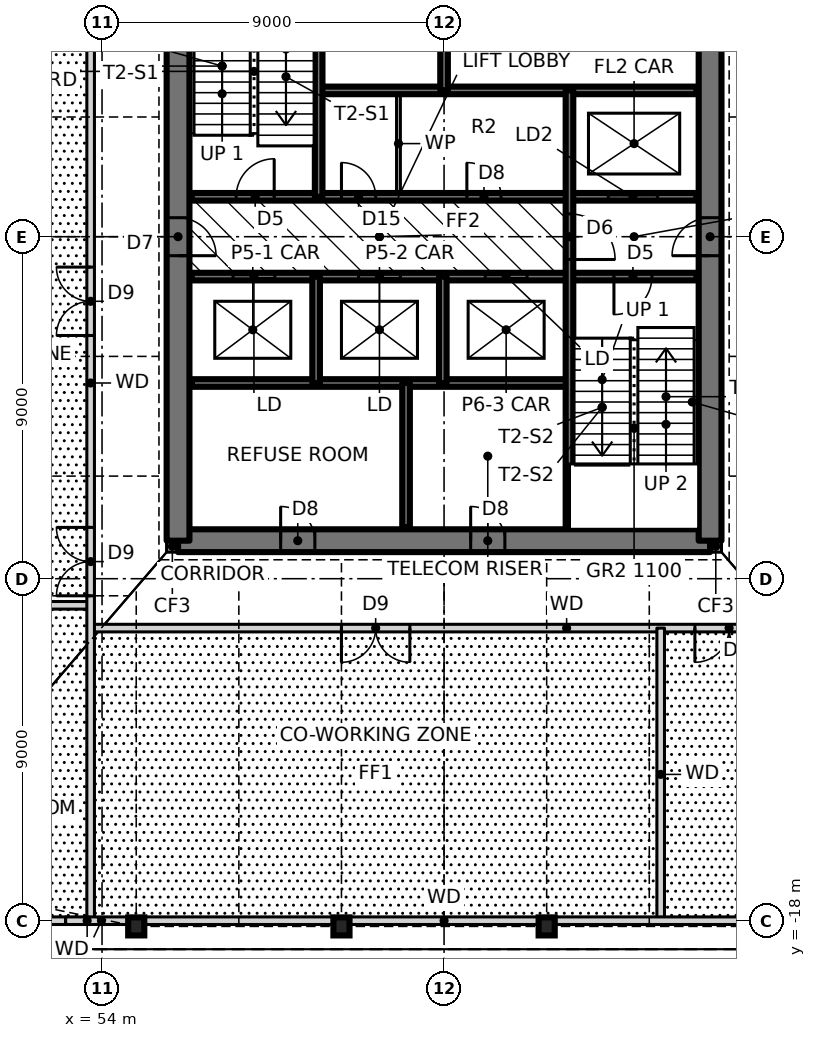
"""IFC4 building model, lengths in metres.
Left out: names, types, materials, properties, quantities, classifications, styles, units other than length and angle.
Written with IfcOpenShell. Run it as: python <this file> out.ifc"""

import sys

from ifc_helpers import new_model, si_unit, direction, frame, frame_2d, origin, origin_2d, place, context, subcontext, project, spatial, rectangle, i_section, extrude, element, fill, save


model = new_model("IFC4")
c1 = context("Model", 3, precision=1e-05, world=origin(), true_north=direction((0.0, 1.0)))
c2 = subcontext(c1, "Body", "Model", "MODEL_VIEW")
j1 = project(units=[si_unit("LENGTHUNIT", "METRE"), si_unit("PLANEANGLEUNIT", "RADIAN")], contexts=[c1])
p1 = place(None, origin())
s1 = spatial("IfcSite", under=j1, at=p1, CompositionType="ELEMENT")
p2 = place(p1, origin())
s2 = spatial("IfcBuilding", under=s1, at=p2, CompositionType="ELEMENT")
p3 = place(p2, frame((0.0, 0.0, 6.0)))
s3 = spatial("IfcBuildingStorey", under=s2, at=p3, CompositionType="ELEMENT", Elevation=6.0)
for number, where, z_axis, x_axis in (
    (1, (54.9, -18.15, 0.0), (0.0, 0.0, 1.0), (1.0, 0.0, 0.0)),
    (2, (60.3, -18.15, 0.0), (0.0, 0.0, 1.0), (1.0, 0.0, 0.0)),
    (3, (65.7, -18.15, 0.0), (0.0, 0.0, 1.0), (1.0, 0.0, 0.0)),
):
    element("IfcColumn", number, at=place(p3, frame(where, z_axis=z_axis, x_axis=x_axis)), inside=s3, PredefinedType="COLUMN", context=c2, shape_type="SweptSolid", body=[
        extrude(i_section(OverallWidth=0.424, OverallDepth=0.475, WebThickness=0.048, FlangeThickness=0.077, at=origin_2d()), origin(), (0.0, 0.0, 1.0), 4.5),
    ])
for number, where, z_axis, x_axis in (
    (4, (55.7, -8.15, 0.0), (0.0, 0.0, 1.0), (1.0, 0.0, 0.0)),
    (5, (70.0, -8.15, 0.0), (0.0, 0.0, 1.0), (1.0, 0.0, 0.0)),
):
    element("IfcWall", number, at=place(p3, frame(where, z_axis=z_axis, x_axis=x_axis)), inside=s3, PredefinedType="SOLIDWALL", context=c2, shape_type="SweptSolid", body=[
        extrude(rectangle(XDim=0.3, YDim=0.3, at=frame_2d((0.15, 0.0))), origin(), (0.0, 0.0, 1.0), 4.5),
    ])
p4 = place(p3, frame((56.0, -8.0, 0.0), z_axis=(0.0, 0.0, 1.0), x_axis=(1.0, 0.0, 0.0)))
e6 = element("IfcWall", 6, at=p4, inside=s3, PredefinedType="SHEAR", context=c2, shape_type="SweptSolid", body=[
    extrude(rectangle(XDim=14.0, YDim=0.6, at=frame_2d((7.0, 0.0))), origin(), (0.0, 0.0, 1.0), 4.5),
])
p5 = place(p4, frame((2.7, 0.0, 0.0)))
e7 = element("IfcOpeningElement", 7, at=p5, cuts=e6, PredefinedType="OPENING", context=c2, shape_type="SweptSolid", body=[
    extrude(rectangle(XDim=0.9, YDim=2.1, at=frame_2d((0.45, 1.05))), frame((0.0, 0.31, 0.0), z_axis=(0.0, -1.0, 0.0), x_axis=(1.0, 0.0, 0.0)), (0.0, 0.0, 1.0), 0.62),
])
p6 = place(p4, frame((7.7, 0.0, 0.0)))
e8 = element("IfcOpeningElement", 8, at=p6, cuts=e6, PredefinedType="OPENING", context=c2, shape_type="SweptSolid", body=[
    extrude(rectangle(XDim=0.9, YDim=2.1, at=frame_2d((0.45, 1.05))), frame((0.0, 0.31, 0.0), z_axis=(0.0, -1.0, 0.0), x_axis=(1.0, 0.0, 0.0)), (0.0, 0.0, 1.0), 0.62),
])
p7 = place(p3, frame((70.0, -8.0, 0.0), z_axis=(0.0, 0.0, 1.0), x_axis=(0.0, 1.0, 0.0)))
e9 = element("IfcWall", 9, at=p7, inside=s3, PredefinedType="SHEAR", context=c2, shape_type="SweptSolid", body=[
    extrude(rectangle(XDim=16.0, YDim=0.6, at=frame_2d((8.0, 0.0))), origin(), (0.0, 0.0, 1.0), 4.5),
])
p8 = place(p7, frame((7.5, 0.0, 0.0)))
e10 = element("IfcOpeningElement", 10, at=p8, cuts=e9, PredefinedType="OPENING", context=c2, shape_type="SweptSolid", body=[
    extrude(rectangle(XDim=1.0, YDim=2.1, at=frame_2d((0.5, 1.05))), frame((0.0, 0.31, 0.0), z_axis=(0.0, -1.0, 0.0), x_axis=(1.0, 0.0, 0.0)), (0.0, 0.0, 1.0), 0.62),
])
p9 = place(p3, frame((56.0, 8.0, 0.0), z_axis=(0.0, 0.0, 1.0), x_axis=(0.0, -1.0, 0.0)))
e11 = element("IfcWall", 11, at=p9, inside=s3, PredefinedType="SHEAR", context=c2, shape_type="SweptSolid", body=[
    extrude(rectangle(XDim=16.0, YDim=0.6, at=frame_2d((8.0, 0.0))), origin(), (0.0, 0.0, 1.0), 4.5),
])
p10 = place(p9, frame((7.5, 0.0, 0.0)))
e12 = element("IfcOpeningElement", 12, at=p10, cuts=e11, PredefinedType="OPENING", context=c2, shape_type="SweptSolid", body=[
    extrude(rectangle(XDim=1.0, YDim=2.1, at=frame_2d((0.5, 1.05))), frame((0.0, 0.31, 0.0), z_axis=(0.0, -1.0, 0.0), x_axis=(1.0, 0.0, 0.0)), (0.0, 0.0, 1.0), 0.62),
])
p11 = place(p3, frame((47.25, -18.0, 0.0), z_axis=(0.0, 0.0, 1.0), x_axis=(1.0, 0.0, 0.0)))
e13 = element("IfcWall", 13, at=p11, inside=s3, PredefinedType="SOLIDWALL", context=c2, shape_type="SweptSolid", body=[
    extrude(rectangle(XDim=5.793, YDim=0.2, at=frame_2d((2.896, 0.0))), origin(), (0.0, 0.0, 1.0), 4.25),
])
p12 = place(p3, frame((53.7, -10.3, 0.0), z_axis=(0.0, 0.0, 1.0), x_axis=(1.0, 0.0, 0.0)))
e14 = element("IfcWall", 14, at=p12, inside=s3, PredefinedType="SOLIDWALL", context=c2, shape_type="SweptSolid", body=[
    extrude(rectangle(XDim=25.05, YDim=0.2, at=frame_2d((12.525, 0.0))), origin(), (0.0, 0.0, 1.0), 4.25),
])
p13 = place(p12, frame((6.6, 0.0, 0.0)))
e15 = element("IfcOpeningElement", 15, at=p13, cuts=e14, PredefinedType="OPENING", context=c2, shape_type="SweptSolid", body=[
    extrude(rectangle(XDim=1.8, YDim=2.1, at=frame_2d((0.9, 1.05))), frame((0.0, 0.11, 0.0), z_axis=(0.0, -1.0, 0.0), x_axis=(1.0, 0.0, 0.0)), (0.0, 0.0, 1.0), 0.22),
])
p14 = place(p12, frame((15.9, 0.0, 0.0)))
e16 = element("IfcOpeningElement", 16, at=p14, cuts=e14, PredefinedType="OPENING", context=c2, shape_type="SweptSolid", body=[
    extrude(rectangle(XDim=1.8, YDim=2.1, at=frame_2d((0.9, 1.05))), frame((0.0, 0.11, 0.0), z_axis=(0.0, -1.0, 0.0), x_axis=(1.0, 0.0, 0.0)), (0.0, 0.0, 1.0), 0.22),
])
p15 = place(p3, frame((47.25, -9.7, 0.0), z_axis=(0.0, 0.0, 1.0), x_axis=(1.0, 0.0, 0.0)))
e17 = element("IfcWall", 17, at=p15, inside=s3, PredefinedType="SOLIDWALL", context=c2, shape_type="SweptSolid", body=[
    extrude(rectangle(XDim=6.45, YDim=0.2, at=frame_2d((3.225, 0.0))), origin(), (0.0, 0.0, 1.0), 4.25),
])
p16 = place(p15, frame((2.325, 0.0, 0.0)))
e18 = element("IfcOpeningElement", 18, at=p16, cuts=e17, PredefinedType="OPENING", context=c2, shape_type="SweptSolid", body=[
    extrude(rectangle(XDim=1.8, YDim=2.1, at=frame_2d((0.9, 1.05))), frame((0.0, 0.11, 0.0), z_axis=(0.0, -1.0, 0.0), x_axis=(1.0, 0.0, 0.0)), (0.0, 0.0, 1.0), 0.22),
])
p17 = place(p3, frame((56.36, -3.85, 0.0), z_axis=(0.0, 0.0, 1.0), x_axis=(1.0, 0.0, 0.0)))
e19 = element("IfcWall", 19, at=p17, inside=s3, PredefinedType="SOLIDWALL", context=c2, shape_type="SweptSolid", body=[
    extrude(rectangle(XDim=9.94, YDim=0.2, at=frame_2d((4.97, 0.0))), origin(), (0.0, 0.0, 1.0), 4.5),
])
p18 = place(p3, frame((56.36, -1.05, 0.0), z_axis=(0.0, 0.0, 1.0), x_axis=(1.0, 0.0, 0.0)))
e20 = element("IfcWall", 20, at=p18, inside=s3, PredefinedType="SOLIDWALL", context=c2, shape_type="SweptSolid", body=[
    extrude(rectangle(XDim=13.28, YDim=0.2, at=frame_2d((6.64, 0.0))), origin(), (0.0, 0.0, 1.0), 4.5),
])
p19 = place(p18, frame((11.11, 0.0, 0.0)))
e21 = element("IfcOpeningElement", 21, at=p19, cuts=e20, PredefinedType="OPENING", context=c2, shape_type="SweptSolid", body=[
    extrude(rectangle(XDim=1.0, YDim=2.1, at=frame_2d((0.5, 1.05))), frame((0.0, 0.11, 0.0), z_axis=(0.0, -1.0, 0.0), x_axis=(1.0, 0.0, 0.0)), (0.0, 0.0, 1.0), 0.22),
])
p20 = place(p18, frame((1.087, 0.0, 0.0)))
e22 = element("IfcOpeningElement", 22, at=p20, cuts=e20, PredefinedType="OPENING", context=c2, shape_type="SweptSolid", body=[
    extrude(rectangle(XDim=1.1, YDim=2.1, at=frame_2d((0.55, 1.05))), frame((0.0, 0.11, 0.0), z_axis=(0.0, -1.0, 0.0), x_axis=(1.0, 0.0, 0.0)), (0.0, 0.0, 1.0), 0.22),
])
p21 = place(p18, frame((4.39, 0.0, 0.0)))
e23 = element("IfcOpeningElement", 23, at=p21, cuts=e20, PredefinedType="OPENING", context=c2, shape_type="SweptSolid", body=[
    extrude(rectangle(XDim=1.1, YDim=2.1, at=frame_2d((0.55, 1.05))), frame((0.0, 0.11, 0.0), z_axis=(0.0, -1.0, 0.0), x_axis=(1.0, 0.0, 0.0)), (0.0, 0.0, 1.0), 0.22),
])
p22 = place(p18, frame((7.724, 0.0, 0.0)))
e24 = element("IfcOpeningElement", 24, at=p22, cuts=e20, PredefinedType="OPENING", context=c2, shape_type="SweptSolid", body=[
    extrude(rectangle(XDim=1.1, YDim=2.1, at=frame_2d((0.55, 1.05))), frame((0.0, 0.11, 0.0), z_axis=(0.0, -1.0, 0.0), x_axis=(1.0, 0.0, 0.0)), (0.0, 0.0, 1.0), 0.22),
])
p23 = place(p3, frame((56.36, 1.05, 0.0), z_axis=(0.0, 0.0, 1.0), x_axis=(1.0, 0.0, 0.0)))
e25 = element("IfcWall", 25, at=p23, inside=s3, PredefinedType="SOLIDWALL", context=c2, shape_type="SweptSolid", body=[
    extrude(rectangle(XDim=13.28, YDim=0.2, at=frame_2d((6.64, 0.0))), origin(), (0.0, 0.0, 1.0), 4.5),
])
p24 = place(p23, frame((1.17, 0.0, 0.0)))
e26 = element("IfcOpeningElement", 26, at=p24, cuts=e25, PredefinedType="OPENING", context=c2, shape_type="SweptSolid", body=[
    extrude(rectangle(XDim=1.0, YDim=2.1, at=frame_2d((0.5, 1.05))), frame((0.0, 0.11, 0.0), z_axis=(0.0, -1.0, 0.0), x_axis=(1.0, 0.0, 0.0)), (0.0, 0.0, 1.0), 0.22),
])
p25 = place(p23, frame((7.24, 0.0, 0.0)))
e27 = element("IfcOpeningElement", 27, at=p25, cuts=e25, PredefinedType="OPENING", context=c2, shape_type="SweptSolid", body=[
    extrude(rectangle(XDim=0.9, YDim=2.1, at=frame_2d((0.45, 1.05))), frame((0.0, 0.11, 0.0), z_axis=(0.0, -1.0, 0.0), x_axis=(1.0, 0.0, 0.0)), (0.0, 0.0, 1.0), 0.22),
])
p26 = place(p23, frame((3.94, 0.0, 0.0)))
e28 = element("IfcOpeningElement", 28, at=p26, cuts=e25, PredefinedType="OPENING", context=c2, shape_type="SweptSolid", body=[
    extrude(rectangle(XDim=0.9, YDim=2.1, at=frame_2d((0.45, 1.05))), frame((0.0, 0.11, 0.0), z_axis=(0.0, -1.0, 0.0), x_axis=(1.0, 0.0, 0.0)), (0.0, 0.0, 1.0), 0.22),
])
p27 = place(p23, frame((10.96, 0.0, 0.0)))
e29 = element("IfcOpeningElement", 29, at=p27, cuts=e25, PredefinedType="OPENING", context=c2, shape_type="SweptSolid", body=[
    extrude(rectangle(XDim=1.3, YDim=2.1, at=frame_2d((0.65, 1.05))), frame((0.0, 0.11, 0.0), z_axis=(0.0, -1.0, 0.0), x_axis=(1.0, 0.0, 0.0)), (0.0, 0.0, 1.0), 0.22),
])
p28 = place(p3, frame((59.7, 3.85, 0.0), z_axis=(0.0, 0.0, 1.0), x_axis=(1.0, 0.0, 0.0)))
e30 = element("IfcWall", 30, at=p28, inside=s3, PredefinedType="SOLIDWALL", context=c2, shape_type="SweptSolid", body=[
    extrude(rectangle(XDim=9.94, YDim=0.2, at=frame_2d((4.97, 0.0))), origin(), (0.0, 0.0, 1.0), 4.5),
])
p29 = place(p3, frame((68.7, -18.0, 0.0), z_axis=(0.0, 0.0, 1.0), x_axis=(0.0, 1.0, 0.0)))
e31 = element("IfcWall", 31, at=p29, inside=s3, PredefinedType="SOLIDWALL", context=c2, shape_type="SweptSolid", body=[
    extrude(rectangle(XDim=7.7, YDim=0.2, at=frame_2d((3.85, 0.0))), origin(), (0.0, 0.0, 1.0), 4.25),
])
p30 = place(p3, frame((66.3, -7.64, 0.0), z_axis=(0.0, 0.0, 1.0), x_axis=(0.0, 1.0, 0.0)))
e32 = element("IfcWall", 32, at=p30, inside=s3, PredefinedType="SOLIDWALL", context=c2, shape_type="SweptSolid", body=[
    extrude(rectangle(XDim=11.49, YDim=0.2, at=frame_2d((5.745, 0.0))), origin(), (0.0, 0.0, 1.0), 4.5),
])
p31 = place(p30, frame((7.04, 0.0, 0.0)))
e33 = element("IfcOpeningElement", 33, at=p31, cuts=e32, PredefinedType="OPENING", context=c2, shape_type="SweptSolid", body=[
    extrude(rectangle(XDim=1.2, YDim=2.1, at=frame_2d((0.6, 1.05))), frame((0.0, 0.11, 0.0), z_axis=(0.0, -1.0, 0.0), x_axis=(1.0, 0.0, 0.0)), (0.0, 0.0, 1.0), 0.22),
])
p32 = place(p3, frame((63.0, 3.85, 0.0), z_axis=(0.0, 0.0, 1.0), x_axis=(0.0, 1.0, 0.0)))
e34 = element("IfcWall", 34, at=p32, inside=s3, PredefinedType="SOLIDWALL", context=c2, shape_type="SweptSolid", body=[
    extrude(rectangle(XDim=3.79, YDim=0.2, at=frame_2d((1.895, 0.0))), origin(), (0.0, 0.0, 1.0), 4.5),
])
p33 = place(p3, frame((62.967, -3.85, 0.0), z_axis=(0.0, 0.0, 1.0), x_axis=(0.0, 1.0, 0.0)))
e35 = element("IfcWall", 35, at=p33, inside=s3, PredefinedType="SOLIDWALL", context=c2, shape_type="SweptSolid", body=[
    extrude(rectangle(XDim=2.8, YDim=0.2, at=frame_2d((1.4, 0.0))), origin(), (0.0, 0.0, 1.0), 4.5),
])
p34 = place(p3, frame((62.0, -7.64, 0.0), z_axis=(0.0, 0.0, 1.0), x_axis=(0.0, 1.0, 0.0)))
e36 = element("IfcWall", 36, at=p34, inside=s3, PredefinedType="SOLIDWALL", context=c2, shape_type="SweptSolid", body=[
    extrude(rectangle(XDim=3.79, YDim=0.2, at=frame_2d((1.895, 0.0))), origin(), (0.0, 0.0, 1.0), 4.5),
])
p35 = place(p3, frame((61.8, 1.05, 0.0), z_axis=(0.0, 0.0, 1.0), x_axis=(0.0, 1.0, 0.0)))
e37 = element("IfcWall", 37, at=p35, inside=s3, PredefinedType="PARTITIONING", context=c2, shape_type="SweptSolid", body=[
    extrude(rectangle(XDim=2.8, YDim=0.1, at=frame_2d((1.4, 0.0))), origin(), (0.0, 0.0, 1.0), 4.3),
])
p36 = place(p3, frame((59.7, 1.05, 0.0), z_axis=(0.0, 0.0, 1.0), x_axis=(0.0, 1.0, 0.0)))
e38 = element("IfcWall", 38, at=p36, inside=s3, PredefinedType="SOLIDWALL", context=c2, shape_type="SweptSolid", body=[
    extrude(rectangle(XDim=6.59, YDim=0.2, at=frame_2d((3.295, 0.0))), origin(), (0.0, 0.0, 1.0), 4.5),
])
p37 = place(p3, frame((59.633, -3.85, 0.0), z_axis=(0.0, 0.0, 1.0), x_axis=(0.0, 1.0, 0.0)))
e39 = element("IfcWall", 39, at=p37, inside=s3, PredefinedType="SOLIDWALL", context=c2, shape_type="SweptSolid", body=[
    extrude(rectangle(XDim=2.8, YDim=0.2, at=frame_2d((1.4, 0.0))), origin(), (0.0, 0.0, 1.0), 4.5),
])
p38 = place(p3, frame((53.7, -18.0, 0.0), z_axis=(0.0, 0.0, 1.0), x_axis=(0.0, 1.0, 0.0)))
e40 = element("IfcWall", 40, at=p38, inside=s3, PredefinedType="SOLIDWALL", context=c2, shape_type="SweptSolid", body=[
    extrude(rectangle(XDim=28.3, YDim=0.2, at=frame_2d((14.15, 0.0))), origin(), (0.0, 0.0, 1.0), 4.25),
])
p39 = place(p38, frame((15.4, 0.0, 0.0)))
e41 = element("IfcOpeningElement", 41, at=p39, cuts=e40, PredefinedType="OPENING", context=c2, shape_type="SweptSolid", body=[
    extrude(rectangle(XDim=1.8, YDim=2.1, at=frame_2d((0.9, 1.05))), frame((0.0, 0.11, 0.0), z_axis=(0.0, -1.0, 0.0), x_axis=(1.0, 0.0, 0.0)), (0.0, 0.0, 1.0), 0.22),
])
p40 = place(p38, frame((25.4, 0.0, 0.0)))
e42 = element("IfcOpeningElement", 42, at=p40, cuts=e40, PredefinedType="OPENING", context=c2, shape_type="SweptSolid", body=[
    extrude(rectangle(XDim=1.8, YDim=2.1, at=frame_2d((0.9, 1.05))), frame((0.0, 0.11, 0.0), z_axis=(0.0, -1.0, 0.0), x_axis=(1.0, 0.0, 0.0)), (0.0, 0.0, 1.0), 0.22),
])
p41 = place(p38, frame((8.55, 0.0, 0.0)))
e43 = element("IfcOpeningElement", 43, at=p41, cuts=e40, PredefinedType="OPENING", context=c2, shape_type="SweptSolid", body=[
    extrude(rectangle(XDim=1.8, YDim=2.1, at=frame_2d((0.9, 1.05))), frame((0.0, 0.11, 0.0), z_axis=(0.0, -1.0, 0.0), x_axis=(1.0, 0.0, 0.0)), (0.0, 0.0, 1.0), 0.22),
])
p42 = place(p3, frame((53.043, -18.0, 0.0), z_axis=(0.0, 0.0, 1.0), x_axis=(1.0, 0.0, 0.0)))
e44 = element("IfcWall", 44, at=p42, inside=s3, PredefinedType="SOLIDWALL", context=c2, shape_type="SweptSolid", body=[
    extrude(rectangle(XDim=1.884, YDim=0.2, at=frame_2d((0.942, 0.0))), origin(), (0.0, 0.0, 1.0), 3.488),
])
p43 = place(p3, frame((54.927, -18.0, 0.0), z_axis=(0.0, 0.0, 1.0), x_axis=(1.0, 0.0, 0.0)))
e45 = element("IfcWall", 45, at=p43, inside=s3, PredefinedType="SOLIDWALL", context=c2, shape_type="SweptSolid", body=[
    extrude(rectangle(XDim=16.146, YDim=0.2, at=frame_2d((8.073, 0.0))), origin(), (0.0, 0.0, 1.0), 4.25),
])
p44 = place(p24, origin())
e46 = element("IfcDoor", 46, at=p44, inside=s3, OperationType="SINGLE_SWING_RIGHT", PredefinedType="DOOR", context=c2, shape_type="SweptSolid", body=[
    extrude(rectangle(XDim=1.0, YDim=2.1, at=frame_2d((0.5, 1.05))), frame((0.0, 0.025, 0.0), z_axis=(0.0, -1.0, 0.0), x_axis=(1.0, 0.0, 0.0)), (0.0, 0.0, 1.0), 0.05),
])
fill(e26, e46)
p45 = place(p19, frame((1.0, 0.0, 0.0), z_axis=(0.0, 0.0, 1.0), x_axis=(-1.0, 0.0, 0.0)))
e47 = element("IfcDoor", 47, at=p45, inside=s3, OperationType="SINGLE_SWING_RIGHT", PredefinedType="DOOR", context=c2, shape_type="SweptSolid", body=[
    extrude(rectangle(XDim=1.0, YDim=2.1, at=frame_2d((0.5, 1.05))), frame((0.0, 0.025, 0.0), z_axis=(0.0, -1.0, 0.0), x_axis=(1.0, 0.0, 0.0)), (0.0, 0.0, 1.0), 0.05),
])
fill(e21, e47)
p46 = place(p31, frame((1.2, 0.0, 0.0), z_axis=(0.0, 0.0, 1.0), x_axis=(-1.0, 0.0, 0.0)))
e48 = element("IfcDoor", 48, at=p46, inside=s3, OperationType="SINGLE_SWING_RIGHT", PredefinedType="DOOR", context=c2, shape_type="SweptSolid", body=[
    extrude(rectangle(XDim=1.2, YDim=2.1, at=frame_2d((0.6, 1.05))), frame((0.0, 0.025, 0.0), z_axis=(0.0, -1.0, 0.0), x_axis=(1.0, 0.0, 0.0)), (0.0, 0.0, 1.0), 0.05),
])
fill(e33, e48)
p47 = place(p25, origin())
e49 = element("IfcDoor", 49, at=p47, inside=s3, OperationType="SINGLE_SWING_LEFT", PredefinedType="DOOR", context=c2, shape_type="SweptSolid", body=[
    extrude(rectangle(XDim=0.9, YDim=2.1, at=frame_2d((0.45, 1.05))), frame((0.0, 0.025, 0.0), z_axis=(0.0, -1.0, 0.0), x_axis=(1.0, 0.0, 0.0)), (0.0, 0.0, 1.0), 0.05),
])
fill(e27, e49)
p48 = place(p26, origin())
e50 = element("IfcDoor", 50, at=p48, inside=s3, OperationType="SINGLE_SWING_LEFT", PredefinedType="DOOR", context=c2, shape_type="SweptSolid", body=[
    extrude(rectangle(XDim=0.9, YDim=2.1, at=frame_2d((0.45, 1.05))), frame((0.0, 0.025, 0.0), z_axis=(0.0, -1.0, 0.0), x_axis=(1.0, 0.0, 0.0)), (0.0, 0.0, 1.0), 0.05),
])
fill(e28, e50)
p49 = place(p39, origin())
e51 = element("IfcDoor", 51, at=p49, inside=s3, OperationType="DOUBLE_DOOR_SINGLE_SWING", PredefinedType="DOOR", context=c2, shape_type="SweptSolid", body=[
    extrude(rectangle(XDim=1.8, YDim=2.1, at=frame_2d((0.9, 1.05))), frame((0.0, 0.025, 0.0), z_axis=(0.0, -1.0, 0.0), x_axis=(1.0, 0.0, 0.0)), (0.0, 0.0, 1.0), 0.05),
])
fill(e41, e51)
p50 = place(p13, frame((1.8, 0.0, 0.0), z_axis=(0.0, 0.0, 1.0), x_axis=(-1.0, 0.0, 0.0)))
e52 = element("IfcDoor", 52, at=p50, inside=s3, OperationType="DOUBLE_DOOR_SINGLE_SWING", PredefinedType="DOOR", context=c2, shape_type="SweptSolid", body=[
    extrude(rectangle(XDim=1.8, YDim=2.1, at=frame_2d((0.9, 1.05))), frame((0.0, 0.025, 0.0), z_axis=(0.0, -1.0, 0.0), x_axis=(1.0, 0.0, 0.0)), (0.0, 0.0, 1.0), 0.05),
])
fill(e15, e52)
p51 = place(p14, frame((1.8, 0.0, 0.0), z_axis=(0.0, 0.0, 1.0), x_axis=(-1.0, 0.0, 0.0)))
e53 = element("IfcDoor", 53, at=p51, inside=s3, OperationType="DOUBLE_DOOR_SINGLE_SWING", PredefinedType="DOOR", context=c2, shape_type="SweptSolid", body=[
    extrude(rectangle(XDim=1.8, YDim=2.1, at=frame_2d((0.9, 1.05))), frame((0.0, 0.025, 0.0), z_axis=(0.0, -1.0, 0.0), x_axis=(1.0, 0.0, 0.0)), (0.0, 0.0, 1.0), 0.05),
])
fill(e16, e53)
p52 = place(p41, origin())
e54 = element("IfcDoor", 54, at=p52, inside=s3, OperationType="DOUBLE_DOOR_SINGLE_SWING", PredefinedType="DOOR", context=c2, shape_type="SweptSolid", body=[
    extrude(rectangle(XDim=1.8, YDim=2.1, at=frame_2d((0.9, 1.05))), frame((0.0, 0.025, 0.0), z_axis=(0.0, -1.0, 0.0), x_axis=(1.0, 0.0, 0.0)), (0.0, 0.0, 1.0), 0.05),
])
fill(e43, e54)
p53 = place(p10, origin())
e55 = element("IfcDoor", 55, at=p53, inside=s3, OperationType="SINGLE_SWING_RIGHT", PredefinedType="DOOR", context=c2, shape_type="SweptSolid", body=[
    extrude(rectangle(XDim=1.0, YDim=2.1, at=frame_2d((0.5, 1.05))), frame((0.0, 0.025, 0.0), z_axis=(0.0, -1.0, 0.0), x_axis=(1.0, 0.0, 0.0)), (0.0, 0.0, 1.0), 0.05),
])
fill(e12, e55)
p54 = place(p8, origin())
e56 = element("IfcDoor", 56, at=p54, inside=s3, OperationType="SINGLE_SWING_LEFT", PredefinedType="DOOR", context=c2, shape_type="SweptSolid", body=[
    extrude(rectangle(XDim=1.0, YDim=2.1, at=frame_2d((0.5, 1.05))), frame((0.0, 0.025, 0.0), z_axis=(0.0, -1.0, 0.0), x_axis=(1.0, 0.0, 0.0)), (0.0, 0.0, 1.0), 0.05),
])
fill(e10, e56)
p55 = place(p5, origin())
e57 = element("IfcDoor", 57, at=p55, inside=s3, OperationType="SINGLE_SWING_LEFT", PredefinedType="DOOR", context=c2, shape_type="SweptSolid", body=[
    extrude(rectangle(XDim=0.9, YDim=2.1, at=frame_2d((0.45, 1.05))), frame((0.0, 0.025, 0.0), z_axis=(0.0, -1.0, 0.0), x_axis=(1.0, 0.0, 0.0)), (0.0, 0.0, 1.0), 0.05),
])
fill(e7, e57)
p56 = place(p6, origin())
e58 = element("IfcDoor", 58, at=p56, inside=s3, OperationType="SINGLE_SWING_LEFT", PredefinedType="DOOR", context=c2, shape_type="SweptSolid", body=[
    extrude(rectangle(XDim=0.9, YDim=2.1, at=frame_2d((0.45, 1.05))), frame((0.0, 0.025, 0.0), z_axis=(0.0, -1.0, 0.0), x_axis=(1.0, 0.0, 0.0)), (0.0, 0.0, 1.0), 0.05),
])
fill(e8, e58)
p57 = place(p20, origin())
e59 = element("IfcDoor", 59, at=p57, inside=s3, OperationType="DOUBLE_DOOR_SLIDING", PredefinedType="DOOR", context=c2, shape_type="SweptSolid", body=[
    extrude(rectangle(XDim=1.1, YDim=2.1, at=frame_2d((0.55, 1.05))), frame((0.0, 0.025, 0.0), z_axis=(0.0, -1.0, 0.0), x_axis=(1.0, 0.0, 0.0)), (0.0, 0.0, 1.0), 0.05),
])
fill(e22, e59)
p58 = place(p21, origin())
e60 = element("IfcDoor", 60, at=p58, inside=s3, OperationType="DOUBLE_DOOR_SLIDING", PredefinedType="DOOR", context=c2, shape_type="SweptSolid", body=[
    extrude(rectangle(XDim=1.1, YDim=2.1, at=frame_2d((0.55, 1.05))), frame((0.0, 0.025, 0.0), z_axis=(0.0, -1.0, 0.0), x_axis=(1.0, 0.0, 0.0)), (0.0, 0.0, 1.0), 0.05),
])
fill(e23, e60)
p59 = place(p22, origin())
e61 = element("IfcDoor", 61, at=p59, inside=s3, OperationType="DOUBLE_DOOR_SLIDING", PredefinedType="DOOR", context=c2, shape_type="SweptSolid", body=[
    extrude(rectangle(XDim=1.1, YDim=2.1, at=frame_2d((0.55, 1.05))), frame((0.0, 0.025, 0.0), z_axis=(0.0, -1.0, 0.0), x_axis=(1.0, 0.0, 0.0)), (0.0, 0.0, 1.0), 0.05),
])
fill(e24, e61)
p60 = place(p27, origin())
e62 = element("IfcDoor", 62, at=p60, inside=s3, OperationType="SLIDING_TO_LEFT", PredefinedType="DOOR", context=c2, shape_type="SweptSolid", body=[
    extrude(rectangle(XDim=1.3, YDim=2.1, at=frame_2d((0.65, 1.05))), frame((0.0, 0.025, 0.0), z_axis=(0.0, -1.0, 0.0), x_axis=(1.0, 0.0, 0.0)), (0.0, 0.0, 1.0), 0.05),
])
fill(e29, e62)
save(model, sys.argv[1])
